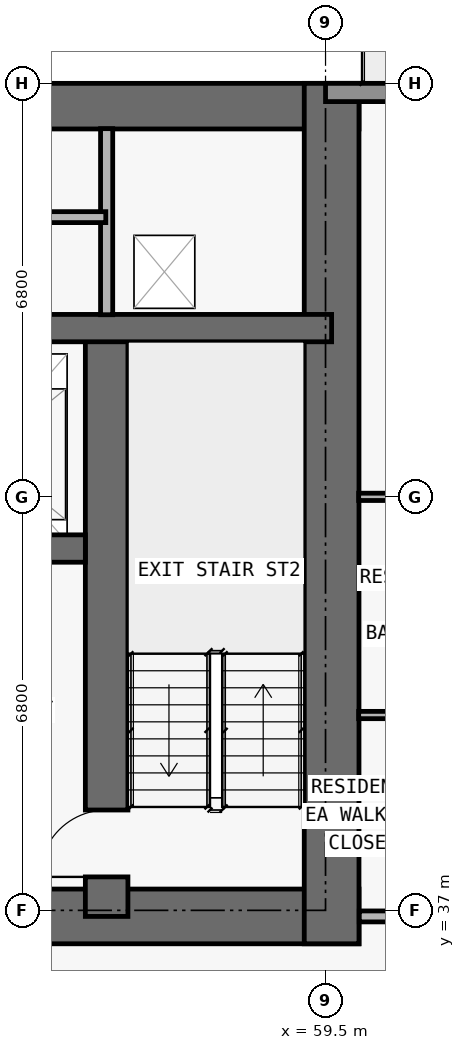
"""IFC4 building model, lengths in metres.
Left out: names, types, materials, properties, quantities, classifications, styles, units other than length and angle.
Written with IfcOpenShell. Run it as: python <this file> out.ifc"""

import sys

from ifc_helpers import new_model, si_unit, direction, frame, frame_2d, origin, place, context, subcontext, project, spatial, rectangle, extrude, element, fill, save


model = new_model("IFC4")
c1 = context("Model", 3, precision=1e-05, world=origin(), true_north=direction((0.0, 1.0)))
c2 = subcontext(c1, "Body", "Model", "MODEL_VIEW")
j1 = project(units=[si_unit("LENGTHUNIT", "METRE"), si_unit("PLANEANGLEUNIT", "RADIAN")], contexts=[c1])
p1 = place(None, origin())
s1 = spatial("IfcSite", under=j1, at=p1, CompositionType="ELEMENT")
p2 = place(p1, origin())
s2 = spatial("IfcBuilding", under=s1, at=p2, CompositionType="ELEMENT")
p3 = place(p2, frame((0.0, 0.0, 30.0)))
s3 = spatial("IfcBuildingStorey", under=s2, at=p3, CompositionType="ELEMENT", Elevation=30.0)
p4 = place(p3, frame((17.75, 36.9, 0.0), z_axis=(0.0, 0.0, 1.0), x_axis=(1.0, 0.0, 0.0)))
e1 = element("IfcWall", 1, at=p4, inside=s3, PredefinedType="SHEAR", context=c2, shape_type="SweptSolid", body=[
    extrude(rectangle(XDim=42.3, YDim=0.9, at=frame_2d((21.15, 0.0))), origin(), (0.0, 0.0, 1.0), 3.05),
])
p5 = place(p4, frame((14.55, 0.0, 0.0)))
e2 = element("IfcOpeningElement", 2, at=p5, cuts=e1, PredefinedType="OPENING", context=c2, shape_type="SweptSolid", body=[
    extrude(rectangle(XDim=1.1, YDim=2.15, at=frame_2d((0.55, 1.075))), frame((0.0, 0.46, 0.0), z_axis=(0.0, -1.0, 0.0), x_axis=(1.0, 0.0, 0.0)), (0.0, 0.0, 1.0), 0.92),
])
p6 = place(p4, frame((6.4, 0.0, 0.0)))
e3 = element("IfcOpeningElement", 3, at=p6, cuts=e1, PredefinedType="OPENING", context=c2, shape_type="SweptSolid", body=[
    extrude(rectangle(XDim=1.05, YDim=2.15, at=frame_2d((0.525, 1.075))), frame((0.0, 0.46, 0.0), z_axis=(0.0, -1.0, 0.0), x_axis=(1.0, 0.0, 0.0)), (0.0, 0.0, 1.0), 0.92),
])
p7 = place(p4, frame((34.9, 0.0, 0.0)))
e4 = element("IfcOpeningElement", 4, at=p7, cuts=e1, PredefinedType="OPENING", context=c2, shape_type="SweptSolid", body=[
    extrude(rectangle(XDim=1.05, YDim=2.15, at=frame_2d((0.525, 1.075))), frame((0.0, 0.46, 0.0), z_axis=(0.0, -1.0, 0.0), x_axis=(1.0, 0.0, 0.0)), (0.0, 0.0, 1.0), 0.92),
])
p8 = place(p4, frame((11.012, 0.0, 0.0)))
e5 = element("IfcOpeningElement", 5, at=p8, cuts=e1, PredefinedType="OPENING", context=c2, shape_type="SweptSolid", body=[
    extrude(rectangle(XDim=1.05, YDim=2.15, at=frame_2d((0.525, 1.075))), frame((0.0, 0.46, 0.0), z_axis=(0.0, -1.0, 0.0), x_axis=(1.0, 0.0, 0.0)), (0.0, 0.0, 1.0), 0.92),
])
p9 = place(p4, frame((24.25, 0.0, 0.0)))
e6 = element("IfcOpeningElement", 6, at=p9, cuts=e1, PredefinedType="OPENING", context=c2, shape_type="SweptSolid", body=[
    extrude(rectangle(XDim=1.05, YDim=2.15, at=frame_2d((0.525, 1.075))), frame((0.0, 0.46, 0.0), z_axis=(0.0, -1.0, 0.0), x_axis=(1.0, 0.0, 0.0)), (0.0, 0.0, 1.0), 0.92),
])
p10 = place(p3, frame((17.75, 50.225, 0.0), z_axis=(0.0, 0.0, 1.0), x_axis=(1.0, 0.0, 0.0)))
e7 = element("IfcWall", 7, at=p10, inside=s3, PredefinedType="SHEAR", context=c2, shape_type="SweptSolid", body=[
    extrude(rectangle(XDim=42.3, YDim=0.75, at=frame_2d((21.15, 0.0))), origin(), (0.0, 0.0, 1.0), 3.05),
])
p11 = place(p3, frame((59.6, 36.45, 0.0), z_axis=(0.0, 0.0, 1.0), x_axis=(0.0, 1.0, 0.0)))
e8 = element("IfcWall", 8, at=p11, inside=s3, PredefinedType="SHEAR", context=c2, shape_type="SweptSolid", body=[
    extrude(rectangle(XDim=14.15, YDim=0.9, at=frame_2d((7.075, 0.0))), origin(), (0.0, 0.0, 1.0), 3.05),
])
p12 = place(p3, frame((55.9, 36.9, 0.0), z_axis=(0.0, 0.0, 1.0), x_axis=(0.0, 1.0, 0.0)))
e9 = element("IfcWall", 9, at=p12, inside=s3, PredefinedType="SHEAR", context=c2, shape_type="SweptSolid", body=[
    extrude(rectangle(XDim=9.675, YDim=0.7, at=frame_2d((4.837, 0.0))), origin(), (0.0, 0.0, 1.0), 3.05),
])
p13 = place(p12, frame((0.65, 0.0, 0.0)))
e10 = element("IfcOpeningElement", 10, at=p13, cuts=e9, PredefinedType="OPENING", context=c2, shape_type="SweptSolid", body=[
    extrude(rectangle(XDim=1.1, YDim=2.15, at=frame_2d((0.55, 1.075))), frame((0.0, 0.36, 0.0), z_axis=(0.0, -1.0, 0.0), x_axis=(1.0, 0.0, 0.0)), (0.0, 0.0, 1.0), 0.72),
])
p14 = place(p3, frame((22.25, 42.95, 0.0), z_axis=(0.0, 0.0, 1.0), x_axis=(1.0, 0.0, 0.0)))
e11 = element("IfcWall", 11, at=p14, inside=s3, PredefinedType="SHEAR", context=c2, shape_type="SweptSolid", body=[
    extrude(rectangle(XDim=33.3, YDim=0.45, at=frame_2d((16.65, 0.0))), origin(), (0.0, 0.0, 1.0), 3.05),
])
p15 = place(p14, frame((1.05, 0.0, 0.0)))
e12 = element("IfcOpeningElement", 12, at=p15, cuts=e11, PredefinedType="OPENING", context=c2, shape_type="SweptSolid", body=[
    extrude(rectangle(XDim=1.2, YDim=2.2, at=frame_2d((0.6, 1.1))), frame((0.0, 0.235, 0.0), z_axis=(0.0, -1.0, 0.0), x_axis=(1.0, 0.0, 0.0)), (0.0, 0.0, 1.0), 0.47),
])
p16 = place(p14, frame((31.05, 0.0, 0.0)))
e13 = element("IfcOpeningElement", 13, at=p16, cuts=e11, PredefinedType="OPENING", context=c2, shape_type="SweptSolid", body=[
    extrude(rectangle(XDim=1.2, YDim=2.2, at=frame_2d((0.6, 1.1))), frame((0.0, 0.235, 0.0), z_axis=(0.0, -1.0, 0.0), x_axis=(1.0, 0.0, 0.0)), (0.0, 0.0, 1.0), 0.47),
])
p17 = place(p14, frame((13.5, 0.0, 0.0)))
e14 = element("IfcOpeningElement", 14, at=p17, cuts=e11, PredefinedType="OPENING", context=c2, shape_type="SweptSolid", body=[
    extrude(rectangle(XDim=1.1, YDim=2.2, at=frame_2d((0.55, 1.1))), frame((0.0, 0.235, 0.0), z_axis=(0.0, -1.0, 0.0), x_axis=(1.0, 0.0, 0.0)), (0.0, 0.0, 1.0), 0.47),
])
p18 = place(p14, frame((16.1, 0.0, 0.0)))
e15 = element("IfcOpeningElement", 15, at=p18, cuts=e11, PredefinedType="OPENING", context=c2, shape_type="SweptSolid", body=[
    extrude(rectangle(XDim=1.1, YDim=2.2, at=frame_2d((0.55, 1.1))), frame((0.0, 0.235, 0.0), z_axis=(0.0, -1.0, 0.0), x_axis=(1.0, 0.0, 0.0)), (0.0, 0.0, 1.0), 0.47),
])
p19 = place(p14, frame((18.7, 0.0, 0.0)))
e16 = element("IfcOpeningElement", 16, at=p19, cuts=e11, PredefinedType="OPENING", context=c2, shape_type="SweptSolid", body=[
    extrude(rectangle(XDim=1.1, YDim=2.2, at=frame_2d((0.55, 1.1))), frame((0.0, 0.235, 0.0), z_axis=(0.0, -1.0, 0.0), x_axis=(1.0, 0.0, 0.0)), (0.0, 0.0, 1.0), 0.47),
])
p20 = place(p14, frame((3.625, 0.0, 0.0)))
e17 = element("IfcOpeningElement", 17, at=p20, cuts=e11, PredefinedType="OPENING", context=c2, shape_type="SweptSolid", body=[
    extrude(rectangle(XDim=1.05, YDim=2.15, at=frame_2d((0.525, 1.075))), frame((0.0, 0.235, 0.0), z_axis=(0.0, -1.0, 0.0), x_axis=(1.0, 0.0, 0.0)), (0.0, 0.0, 1.0), 0.47),
])
p21 = place(p14, frame((28.675, 0.0, 0.0)))
e18 = element("IfcOpeningElement", 18, at=p21, cuts=e11, PredefinedType="OPENING", context=c2, shape_type="SweptSolid", body=[
    extrude(rectangle(XDim=1.05, YDim=2.15, at=frame_2d((0.525, 1.075))), frame((0.0, 0.235, 0.0), z_axis=(0.0, -1.0, 0.0), x_axis=(1.0, 0.0, 0.0)), (0.0, 0.0, 1.0), 0.47),
])
p22 = place(p3, frame((18.2, 46.575, 0.0), z_axis=(0.0, 0.0, 1.0), x_axis=(1.0, 0.0, 0.0)))
e19 = element("IfcWall", 19, at=p22, inside=s3, PredefinedType="SHEAR", context=c2, shape_type="SweptSolid", body=[
    extrude(rectangle(XDim=41.4, YDim=0.45, at=frame_2d((20.7, 0.0))), origin(), (0.0, 0.0, 1.0), 3.05),
])
p23 = place(p22, frame((7.675, 0.0, 0.0)))
e20 = element("IfcOpeningElement", 20, at=p23, cuts=e19, PredefinedType="OPENING", context=c2, shape_type="SweptSolid", body=[
    extrude(rectangle(XDim=1.05, YDim=2.15, at=frame_2d((0.525, 1.075))), frame((0.0, 0.235, 0.0), z_axis=(0.0, -1.0, 0.0), x_axis=(1.0, 0.0, 0.0)), (0.0, 0.0, 1.0), 0.47),
])
p24 = place(p22, frame((32.725, 0.0, 0.0)))
e21 = element("IfcOpeningElement", 21, at=p24, cuts=e19, PredefinedType="OPENING", context=c2, shape_type="SweptSolid", body=[
    extrude(rectangle(XDim=1.05, YDim=2.15, at=frame_2d((0.525, 1.075))), frame((0.0, 0.235, 0.0), z_axis=(0.0, -1.0, 0.0), x_axis=(1.0, 0.0, 0.0)), (0.0, 0.0, 1.0), 0.47),
])
p25 = place(p3, frame((59.5, 50.45, 0.0), z_axis=(0.0, 0.0, 1.0), x_axis=(1.0, 0.0, 0.0)))
e22 = element("IfcWall", 22, at=p25, inside=s3, PredefinedType="STANDARD", context=c2, shape_type="SweptSolid", body=[
    extrude(rectangle(XDim=13.2, YDim=0.3, at=frame_2d((6.6, 0.0))), origin(), (0.0, 0.0, 1.0), 3.05),
])
p26 = place(p25, frame((5.6, 0.0, 0.0)))
e23 = element("IfcOpeningElement", 23, at=p26, cuts=e22, PredefinedType="OPENING", context=c2, shape_type="SweptSolid", body=[
    extrude(rectangle(XDim=2.0, YDim=2.3, at=frame_2d((1.0, 1.15))), frame((0.0, 0.16, 0.0), z_axis=(0.0, -1.0, 0.0), x_axis=(1.0, 0.0, 0.0)), (0.0, 0.0, 1.0), 0.32),
])
p27 = place(p3, frame((55.9, 46.795, 0.0), z_axis=(0.0, 0.0, 1.0), x_axis=(0.0, 1.0, 0.0)))
e24 = element("IfcWall", 24, at=p27, inside=s3, PredefinedType="PARTITIONING", context=c2, shape_type="SweptSolid", body=[
    extrude(rectangle(XDim=3.06, YDim=0.2, at=frame_2d((1.53, 0.0))), origin(), (0.0, 0.0, 1.0), 3.05),
])
p28 = place(p3, frame((60.055, 36.9, 0.0), z_axis=(0.0, 0.0, 1.0), x_axis=(1.0, 0.0, 0.0)))
e25 = element("IfcWall", 25, at=p28, inside=s3, PredefinedType="PARTITIONING", context=c2, shape_type="SweptSolid", body=[
    extrude(rectangle(XDim=12.645, YDim=0.18, at=frame_2d((6.323, 0.0))), origin(), (0.0, 0.0, 1.0), 3.05),
])
p29 = place(p28, frame((4.52, 0.0, 0.0)))
e26 = element("IfcOpeningElement", 26, at=p29, cuts=e25, PredefinedType="OPENING", context=c2, shape_type="SweptSolid", body=[
    extrude(rectangle(XDim=1.0, YDim=2.2, at=frame_2d((0.5, 1.1))), frame((0.0, 0.1, 0.0), z_axis=(0.0, -1.0, 0.0), x_axis=(1.0, 0.0, 0.0)), (0.0, 0.0, 1.0), 0.2),
])
p30 = place(p3, frame((60.045, 40.212, 0.0), z_axis=(0.0, 0.0, 1.0), x_axis=(1.0, 0.0, 0.0)))
e27 = element("IfcWall", 27, at=p30, inside=s3, PredefinedType="PARTITIONING", context=c2, shape_type="SweptSolid", body=[
    extrude(rectangle(XDim=2.205, YDim=0.12, at=frame_2d((1.103, 0.0))), origin(), (0.0, 0.0, 1.0), 3.05),
])
p31 = place(p3, frame((60.045, 43.8, 0.0), z_axis=(0.0, 0.0, 1.0), x_axis=(1.0, 0.0, 0.0)))
e28 = element("IfcWall", 28, at=p31, inside=s3, PredefinedType="PARTITIONING", context=c2, shape_type="SweptSolid", body=[
    extrude(rectangle(XDim=15.96, YDim=0.12, at=frame_2d((7.98, 0.0))), origin(), (0.0, 0.0, 1.0), 2.339),
])
p32 = place(p31, frame((9.805, 0.0, 0.0)))
e29 = element("IfcOpeningElement", 29, at=p32, cuts=e28, PredefinedType="OPENING", context=c2, shape_type="SweptSolid", body=[
    extrude(rectangle(XDim=0.9, YDim=2.15, at=frame_2d((0.45, 1.075))), frame((0.0, 0.07, 0.0), z_axis=(0.0, -1.0, 0.0), x_axis=(1.0, 0.0, 0.0)), (0.0, 0.0, 1.0), 0.14),
])
p33 = place(p31, frame((4.58, 0.0, 0.0)))
e30 = element("IfcOpeningElement", 30, at=p33, cuts=e28, PredefinedType="OPENING", context=c2, shape_type="SweptSolid", body=[
    extrude(rectangle(XDim=0.9, YDim=2.15, at=frame_2d((0.45, 1.075))), frame((0.0, 0.07, 0.0), z_axis=(0.0, -1.0, 0.0), x_axis=(1.0, 0.0, 0.0)), (0.0, 0.0, 1.0), 0.14),
])
p34 = place(p31, frame((0.677, 0.0, 0.0)))
e31 = element("IfcOpeningElement", 31, at=p34, cuts=e28, PredefinedType="OPENING", context=c2, shape_type="SweptSolid", body=[
    extrude(rectangle(XDim=0.85, YDim=2.1, at=frame_2d((0.425, 1.05))), frame((0.0, 0.07, 0.0), z_axis=(0.0, -1.0, 0.0), x_axis=(1.0, 0.0, 0.0)), (0.0, 0.0, 1.0), 0.14),
])
p35 = place(p3, frame((21.9, 48.4, 0.0), z_axis=(0.0, 0.0, 1.0), x_axis=(1.0, 0.0, 0.0)))
e32 = element("IfcWall", 32, at=p35, inside=s3, PredefinedType="PARTITIONING", context=c2, shape_type="SweptSolid", body=[
    extrude(rectangle(XDim=33.986, YDim=0.18, at=frame_2d((16.993, 0.0))), origin(), (0.0, 0.0, 1.0), 3.05),
])
p36 = place(p35, frame((8.0, 0.0, 0.0)))
e33 = element("IfcOpeningElement", 33, at=p36, cuts=e32, PredefinedType="OPENING", context=c2, shape_type="SweptSolid", body=[
    extrude(rectangle(XDim=1.0, YDim=2.2, at=frame_2d((0.5, 1.1))), frame((0.0, 0.1, 0.0), z_axis=(0.0, -1.0, 0.0), x_axis=(1.0, 0.0, 0.0)), (0.0, 0.0, 1.0), 0.2),
])
p37 = place(p35, frame((24.993, 0.0, 0.0)))
e34 = element("IfcOpeningElement", 34, at=p37, cuts=e32, PredefinedType="OPENING", context=c2, shape_type="SweptSolid", body=[
    extrude(rectangle(XDim=1.0, YDim=2.2, at=frame_2d((0.5, 1.1))), frame((0.0, 0.1, 0.0), z_axis=(0.0, -1.0, 0.0), x_axis=(1.0, 0.0, 0.0)), (0.0, 0.0, 1.0), 0.2),
])
p38 = place(p13, origin())
e35 = element("IfcDoor", 35, at=p38, inside=s3, OperationType="SINGLE_SWING_LEFT", PredefinedType="DOOR", context=c2, shape_type="SweptSolid", body=[
    extrude(rectangle(XDim=1.1, YDim=2.15, at=frame_2d((0.55, 1.075))), frame((0.0, 0.025, 0.0), z_axis=(0.0, -1.0, 0.0), x_axis=(1.0, 0.0, 0.0)), (0.0, 0.0, 1.0), 0.05),
])
fill(e10, e35)
save(model, sys.argv[1])
